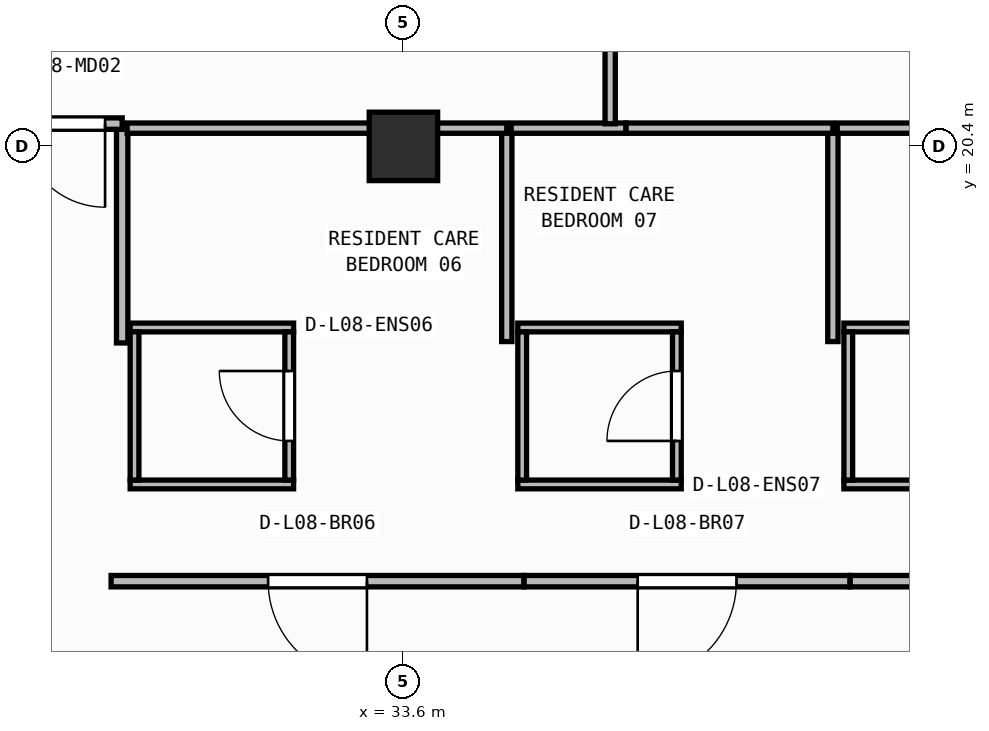
"""IFC4 building model, lengths in metres.
Left out: names, types, materials, properties, quantities, classifications, styles, units other than length and angle.
Written with IfcOpenShell. Run it as: python <this file> out.ifc"""

import sys

from ifc_helpers import new_model, si_unit, direction, frame, frame_2d, origin, origin_2d, place, context, subcontext, project, spatial, rectangle, extrude, element, fill, save


model = new_model("IFC4")
c1 = context("Model", 3, precision=1e-05, world=origin(), true_north=direction((0.0, 1.0)))
c2 = subcontext(c1, "Body", "Model", "MODEL_VIEW")
j1 = project(units=[si_unit("LENGTHUNIT", "METRE"), si_unit("PLANEANGLEUNIT", "RADIAN")], contexts=[c1])
p1 = place(None, origin())
s1 = spatial("IfcSite", under=j1, at=p1, CompositionType="ELEMENT")
p2 = place(p1, origin())
s2 = spatial("IfcBuilding", under=s1, at=p2, CompositionType="ELEMENT")
p3 = place(p2, frame((0.0, 0.0, 34.35)))
s3 = spatial("IfcBuildingStorey", under=s2, at=p3, CompositionType="ELEMENT", Elevation=34.35)
p4 = place(p3, frame((33.6, 20.4, 0.0), z_axis=(0.0, 0.0, 1.0), x_axis=(1.0, 0.0, 0.0)))
e1 = element("IfcColumn", 1, at=p4, inside=s3, PredefinedType="COLUMN", context=c2, shape_type="SweptSolid", body=[
    extrude(rectangle(XDim=0.9, YDim=0.9, at=origin_2d()), origin(), (0.0, 0.0, 1.0), 3.95),
])
p5 = place(p3, frame((30.005, 15.952, 0.0), z_axis=(0.0, 0.0, 1.0), x_axis=(1.0, 0.0, 0.0)))
e2 = element("IfcWall", 2, at=p5, inside=s3, PredefinedType="PARTITIONING", context=c2, shape_type="SweptSolid", body=[
    extrude(rectangle(XDim=2.15, YDim=0.115, at=frame_2d((1.075, 0.0))), origin(), (0.0, 0.0, 1.0), 3.478),
])
p6 = place(p3, frame((30.005, 18.018, 0.0), z_axis=(0.0, 0.0, 1.0), x_axis=(1.0, 0.0, 0.0)))
e3 = element("IfcWall", 3, at=p6, inside=s3, PredefinedType="PARTITIONING", context=c2, shape_type="SweptSolid", body=[
    extrude(rectangle(XDim=2.15, YDim=0.115, at=frame_2d((1.075, 0.0))), origin(), (0.0, 0.0, 1.0), 3.71),
])
p7 = place(p3, frame((30.062, 16.01, 0.0), z_axis=(0.0, 0.0, 1.0), x_axis=(0.0, 1.0, 0.0)))
e4 = element("IfcWall", 4, at=p7, inside=s3, PredefinedType="PARTITIONING", context=c2, shape_type="SweptSolid", body=[
    extrude(rectangle(XDim=1.95, YDim=0.115, at=frame_2d((0.975, 0.0))), origin(), (0.0, 0.0, 1.0), 3.71),
])
p8 = place(p3, frame((32.097, 16.01, 0.0), z_axis=(0.0, 0.0, 1.0), x_axis=(0.0, 1.0, 0.0)))
e5 = element("IfcWall", 5, at=p8, inside=s3, PredefinedType="PARTITIONING", context=c2, shape_type="SweptSolid", body=[
    extrude(rectangle(XDim=1.95, YDim=0.115, at=frame_2d((0.975, 0.0))), origin(), (0.0, 0.0, 1.0), 3.71),
])
p9 = place(p8, frame((0.515, 0.0, 0.0)))
e6 = element("IfcOpeningElement", 6, at=p9, cuts=e5, PredefinedType="OPENING", context=c2, shape_type="SweptSolid", body=[
    extrude(rectangle(XDim=0.92, YDim=2.1, at=frame_2d((0.46, 1.05))), frame((0.0, 0.067, 0.0), z_axis=(0.0, -1.0, 0.0), x_axis=(1.0, 0.0, 0.0)), (0.0, 0.0, 1.0), 0.135),
])
p10 = place(p3, frame((35.105, 15.952, 0.0), z_axis=(0.0, 0.0, 1.0), x_axis=(1.0, 0.0, 0.0)))
e7 = element("IfcWall", 7, at=p10, inside=s3, PredefinedType="PARTITIONING", context=c2, shape_type="SweptSolid", body=[
    extrude(rectangle(XDim=2.15, YDim=0.115, at=frame_2d((1.075, 0.0))), origin(), (0.0, 0.0, 1.0), 3.478),
])
p11 = place(p3, frame((35.105, 18.018, 0.0), z_axis=(0.0, 0.0, 1.0), x_axis=(1.0, 0.0, 0.0)))
e8 = element("IfcWall", 8, at=p11, inside=s3, PredefinedType="PARTITIONING", context=c2, shape_type="SweptSolid", body=[
    extrude(rectangle(XDim=2.15, YDim=0.115, at=frame_2d((1.075, 0.0))), origin(), (0.0, 0.0, 1.0), 3.71),
])
p12 = place(p3, frame((35.163, 16.01, 0.0), z_axis=(0.0, 0.0, 1.0), x_axis=(0.0, 1.0, 0.0)))
e9 = element("IfcWall", 9, at=p12, inside=s3, PredefinedType="PARTITIONING", context=c2, shape_type="SweptSolid", body=[
    extrude(rectangle(XDim=1.95, YDim=0.115, at=frame_2d((0.975, 0.0))), origin(), (0.0, 0.0, 1.0), 3.71),
])
p13 = place(p3, frame((37.198, 16.01, 0.0), z_axis=(0.0, 0.0, 1.0), x_axis=(0.0, 1.0, 0.0)))
e10 = element("IfcWall", 10, at=p13, inside=s3, PredefinedType="PARTITIONING", context=c2, shape_type="SweptSolid", body=[
    extrude(rectangle(XDim=1.95, YDim=0.115, at=frame_2d((0.975, 0.0))), origin(), (0.0, 0.0, 1.0), 3.71),
])
p14 = place(p13, frame((0.515, 0.0, 0.0)))
e11 = element("IfcOpeningElement", 11, at=p14, cuts=e10, PredefinedType="OPENING", context=c2, shape_type="SweptSolid", body=[
    extrude(rectangle(XDim=0.92, YDim=2.1, at=frame_2d((0.46, 1.05))), frame((0.0, 0.067, 0.0), z_axis=(0.0, -1.0, 0.0), x_axis=(1.0, 0.0, 0.0)), (0.0, 0.0, 1.0), 0.135),
])
p15 = place(p3, frame((39.395, 15.952, 0.0), z_axis=(0.0, 0.0, 1.0), x_axis=(1.0, 0.0, 0.0)))
e12 = element("IfcWall", 12, at=p15, inside=s3, PredefinedType="PARTITIONING", context=c2, shape_type="SweptSolid", body=[
    extrude(rectangle(XDim=2.15, YDim=0.115, at=frame_2d((1.075, 0.0))), origin(), (0.0, 0.0, 1.0), 3.478),
])
p16 = place(p3, frame((39.395, 18.018, 0.0), z_axis=(0.0, 0.0, 1.0), x_axis=(1.0, 0.0, 0.0)))
e13 = element("IfcWall", 13, at=p16, inside=s3, PredefinedType="PARTITIONING", context=c2, shape_type="SweptSolid", body=[
    extrude(rectangle(XDim=2.15, YDim=0.115, at=frame_2d((1.075, 0.0))), origin(), (0.0, 0.0, 1.0), 3.71),
])
p17 = place(p3, frame((39.452, 16.01, 0.0), z_axis=(0.0, 0.0, 1.0), x_axis=(0.0, 1.0, 0.0)))
e14 = element("IfcWall", 14, at=p17, inside=s3, PredefinedType="PARTITIONING", context=c2, shape_type="SweptSolid", body=[
    extrude(rectangle(XDim=1.95, YDim=0.115, at=frame_2d((0.975, 0.0))), origin(), (0.0, 0.0, 1.0), 3.71),
])
p18 = place(p3, frame((35.186, 14.68, 0.0), z_axis=(0.0, 0.0, 1.0), x_axis=(-1.0, 0.0, 0.0)))
e15 = element("IfcWall", 15, at=p18, inside=s3, PredefinedType="PARTITIONING", context=c2, shape_type="SweptSolid", body=[
    extrude(rectangle(XDim=5.432, YDim=0.15, at=frame_2d((2.716, 0.0))), origin(), (0.0, 0.0, 1.0), 3.71),
])
p19 = place(p18, frame((2.066, 0.0, 0.0)))
e16 = element("IfcOpeningElement", 16, at=p19, cuts=e15, PredefinedType="OPENING", context=c2, shape_type="SweptSolid", body=[
    extrude(rectangle(XDim=1.3, YDim=2.15, at=frame_2d((0.65, 1.075))), frame((0.0, 0.085, 0.0), z_axis=(0.0, -1.0, 0.0), x_axis=(1.0, 0.0, 0.0)), (0.0, 0.0, 1.0), 0.17),
])
p20 = place(p3, frame((39.476, 14.68, 0.0), z_axis=(0.0, 0.0, 1.0), x_axis=(-1.0, 0.0, 0.0)))
e17 = element("IfcWall", 17, at=p20, inside=s3, PredefinedType="PARTITIONING", context=c2, shape_type="SweptSolid", body=[
    extrude(rectangle(XDim=4.288, YDim=0.15, at=frame_2d((2.144, 0.0))), origin(), (0.0, 0.0, 1.0), 3.71),
])
p21 = place(p20, frame((1.494, 0.0, 0.0)))
e18 = element("IfcOpeningElement", 18, at=p21, cuts=e17, PredefinedType="OPENING", context=c2, shape_type="SweptSolid", body=[
    extrude(rectangle(XDim=1.3, YDim=2.15, at=frame_2d((0.65, 1.075))), frame((0.0, 0.085, 0.0), z_axis=(0.0, -1.0, 0.0), x_axis=(1.0, 0.0, 0.0)), (0.0, 0.0, 1.0), 0.17),
])
p22 = place(p3, frame((44.136, 14.68, 0.0), z_axis=(0.0, 0.0, 1.0), x_axis=(-1.0, 0.0, 0.0)))
e19 = element("IfcWall", 19, at=p22, inside=s3, PredefinedType="PARTITIONING", context=c2, shape_type="SweptSolid", body=[
    extrude(rectangle(XDim=4.658, YDim=0.15, at=frame_2d((2.329, 0.0))), origin(), (0.0, 0.0, 1.0), 3.71),
])
p23 = place(p22, frame((1.679, 0.0, 0.0)))
e20 = element("IfcOpeningElement", 20, at=p23, cuts=e19, PredefinedType="OPENING", context=c2, shape_type="SweptSolid", body=[
    extrude(rectangle(XDim=1.3, YDim=2.15, at=frame_2d((0.65, 1.075))), frame((0.0, 0.085, 0.0), z_axis=(0.0, -1.0, 0.0), x_axis=(1.0, 0.0, 0.0)), (0.0, 0.0, 1.0), 0.17),
])
p24 = place(p3, frame((29.9, 17.814, 0.0), z_axis=(0.0, 0.0, 1.0), x_axis=(0.0, 1.0, 0.0)))
e21 = element("IfcWall", 21, at=p24, inside=s3, PredefinedType="PARTITIONING", context=c2, shape_type="SweptSolid", body=[
    extrude(rectangle(XDim=2.886, YDim=0.15, at=frame_2d((1.443, 0.0))), origin(), (0.0, 0.0, 1.0), 3.71),
])
p25 = place(p3, frame((29.9, 20.7, 0.0), z_axis=(0.0, 0.0, 1.0), x_axis=(-1.0, 0.0, 0.0)))
e22 = element("IfcWall", 22, at=p25, inside=s3, PredefinedType="PARTITIONING", context=c2, shape_type="SweptSolid", body=[
    extrude(rectangle(XDim=2.5, YDim=0.15, at=frame_2d((1.25, 0.0))), origin(), (0.0, 0.0, 1.0), 3.073),
])
p26 = place(p25, frame((0.225, 0.0, 0.0)))
e23 = element("IfcOpeningElement", 23, at=p26, cuts=e22, PredefinedType="OPENING", context=c2, shape_type="SweptSolid", body=[
    extrude(rectangle(XDim=1.1, YDim=2.1, at=frame_2d((0.55, 1.05))), frame((0.0, 0.085, 0.0), z_axis=(0.0, -1.0, 0.0), x_axis=(1.0, 0.0, 0.0)), (0.0, 0.0, 1.0), 0.17),
])
p27 = place(p3, frame((34.96, 17.833, 0.0), z_axis=(0.0, 0.0, 1.0), x_axis=(0.0, 1.0, 0.0)))
e24 = element("IfcWall", 24, at=p27, inside=s3, PredefinedType="PARTITIONING", context=c2, shape_type="SweptSolid", body=[
    extrude(rectangle(XDim=2.807, YDim=0.135, at=frame_2d((1.404, 0.0))), origin(), (0.0, 0.0, 1.0), 3.71),
])
p28 = place(p3, frame((34.96, 20.64, 0.0), z_axis=(0.0, 0.0, 1.0), x_axis=(-1.0, 0.0, 0.0)))
e25 = element("IfcWall", 25, at=p28, inside=s3, PredefinedType="PARTITIONING", context=c2, shape_type="SweptSolid", body=[
    extrude(rectangle(XDim=4.995, YDim=0.135, at=frame_2d((2.498, 0.0))), origin(), (0.0, 0.0, 1.0), 3.073),
])
p29 = place(p3, frame((39.25, 17.833, 0.0), z_axis=(0.0, 0.0, 1.0), x_axis=(0.0, 1.0, 0.0)))
e26 = element("IfcWall", 26, at=p29, inside=s3, PredefinedType="PARTITIONING", context=c2, shape_type="SweptSolid", body=[
    extrude(rectangle(XDim=2.807, YDim=0.135, at=frame_2d((1.404, 0.0))), origin(), (0.0, 0.0, 1.0), 3.71),
])
p30 = place(p3, frame((36.528, 20.64, 0.0), z_axis=(0.0, 0.0, 1.0), x_axis=(-1.0, 0.0, 0.0)))
e27 = element("IfcWall", 27, at=p30, inside=s3, PredefinedType="PARTITIONING", context=c2, shape_type="SweptSolid", body=[
    extrude(rectangle(XDim=1.51, YDim=0.135, at=frame_2d((0.755, 0.0))), origin(), (0.0, 0.0, 1.0), 3.073),
])
p31 = place(p3, frame((39.25, 20.64, 0.0), z_axis=(0.0, 0.0, 1.0), x_axis=(-1.0, 0.0, 0.0)))
e28 = element("IfcWall", 28, at=p31, inside=s3, PredefinedType="PARTITIONING", context=c2, shape_type="SweptSolid", body=[
    extrude(rectangle(XDim=2.72, YDim=0.135, at=frame_2d((1.36, 0.0))), origin(), (0.0, 0.0, 1.0), 3.073),
])
p32 = place(p3, frame((43.91, 20.64, 0.0), z_axis=(0.0, 0.0, 1.0), x_axis=(-1.0, 0.0, 0.0)))
e29 = element("IfcWall", 29, at=p32, inside=s3, PredefinedType="PARTITIONING", context=c2, shape_type="SweptSolid", body=[
    extrude(rectangle(XDim=4.602, YDim=0.135, at=frame_2d((2.301, 0.0))), origin(), (0.0, 0.0, 1.0), 3.073),
])
p33 = place(p3, frame((36.32, 20.698, 0.0), z_axis=(0.0, 0.0, 1.0), x_axis=(0.0, 1.0, 0.0)))
e30 = element("IfcWall", 30, at=p33, inside=s3, PredefinedType="PARTITIONING", context=c2, shape_type="SweptSolid", body=[
    extrude(rectangle(XDim=10.678, YDim=0.135, at=frame_2d((5.339, 0.0))), origin(), (0.0, 0.0, 1.0), 3.71),
])
p34 = place(p33, frame((4.789, 0.0, 0.0)))
e31 = element("IfcOpeningElement", 31, at=p34, cuts=e30, PredefinedType="OPENING", context=c2, shape_type="SweptSolid", body=[
    extrude(rectangle(XDim=1.1, YDim=2.1, at=frame_2d((0.55, 1.05))), frame((0.0, 0.077, 0.0), z_axis=(0.0, -1.0, 0.0), x_axis=(1.0, 0.0, 0.0)), (0.0, 0.0, 1.0), 0.155),
])
p35 = place(p9, origin())
e32 = element("IfcDoor", 32, at=p35, inside=s3, OperationType="SINGLE_SWING_RIGHT", PredefinedType="DOOR", context=c2, shape_type="SweptSolid", body=[
    extrude(rectangle(XDim=0.92, YDim=2.1, at=frame_2d((0.46, 1.05))), frame((0.0, 0.025, 0.0), z_axis=(0.0, -1.0, 0.0), x_axis=(1.0, 0.0, 0.0)), (0.0, 0.0, 1.0), 0.05),
])
fill(e6, e32)
p36 = place(p14, origin())
e33 = element("IfcDoor", 33, at=p36, inside=s3, OperationType="SINGLE_SWING_LEFT", PredefinedType="DOOR", context=c2, shape_type="SweptSolid", body=[
    extrude(rectangle(XDim=0.92, YDim=2.1, at=frame_2d((0.46, 1.05))), frame((0.0, 0.025, 0.0), z_axis=(0.0, -1.0, 0.0), x_axis=(1.0, 0.0, 0.0)), (0.0, 0.0, 1.0), 0.05),
])
fill(e11, e33)
p37 = place(p19, origin())
e34 = element("IfcDoor", 34, at=p37, inside=s3, OperationType="SINGLE_SWING_LEFT", PredefinedType="DOOR", context=c2, shape_type="SweptSolid", body=[
    extrude(rectangle(XDim=1.3, YDim=2.15, at=frame_2d((0.65, 1.075))), frame((0.0, 0.025, 0.0), z_axis=(0.0, -1.0, 0.0), x_axis=(1.0, 0.0, 0.0)), (0.0, 0.0, 1.0), 0.05),
])
fill(e16, e34)
p38 = place(p21, origin())
e35 = element("IfcDoor", 35, at=p38, inside=s3, OperationType="SINGLE_SWING_RIGHT", PredefinedType="DOOR", context=c2, shape_type="SweptSolid", body=[
    extrude(rectangle(XDim=1.3, YDim=2.15, at=frame_2d((0.65, 1.075))), frame((0.0, 0.025, 0.0), z_axis=(0.0, -1.0, 0.0), x_axis=(1.0, 0.0, 0.0)), (0.0, 0.0, 1.0), 0.05),
])
fill(e18, e35)
p39 = place(p26, origin())
e36 = element("IfcDoor", 36, at=p39, inside=s3, OperationType="SINGLE_SWING_LEFT", PredefinedType="DOOR", context=c2, shape_type="SweptSolid", body=[
    extrude(rectangle(XDim=1.1, YDim=2.1, at=frame_2d((0.55, 1.05))), frame((0.0, 0.025, 0.0), z_axis=(0.0, -1.0, 0.0), x_axis=(1.0, 0.0, 0.0)), (0.0, 0.0, 1.0), 0.05),
])
fill(e23, e36)
save(model, sys.argv[1])
